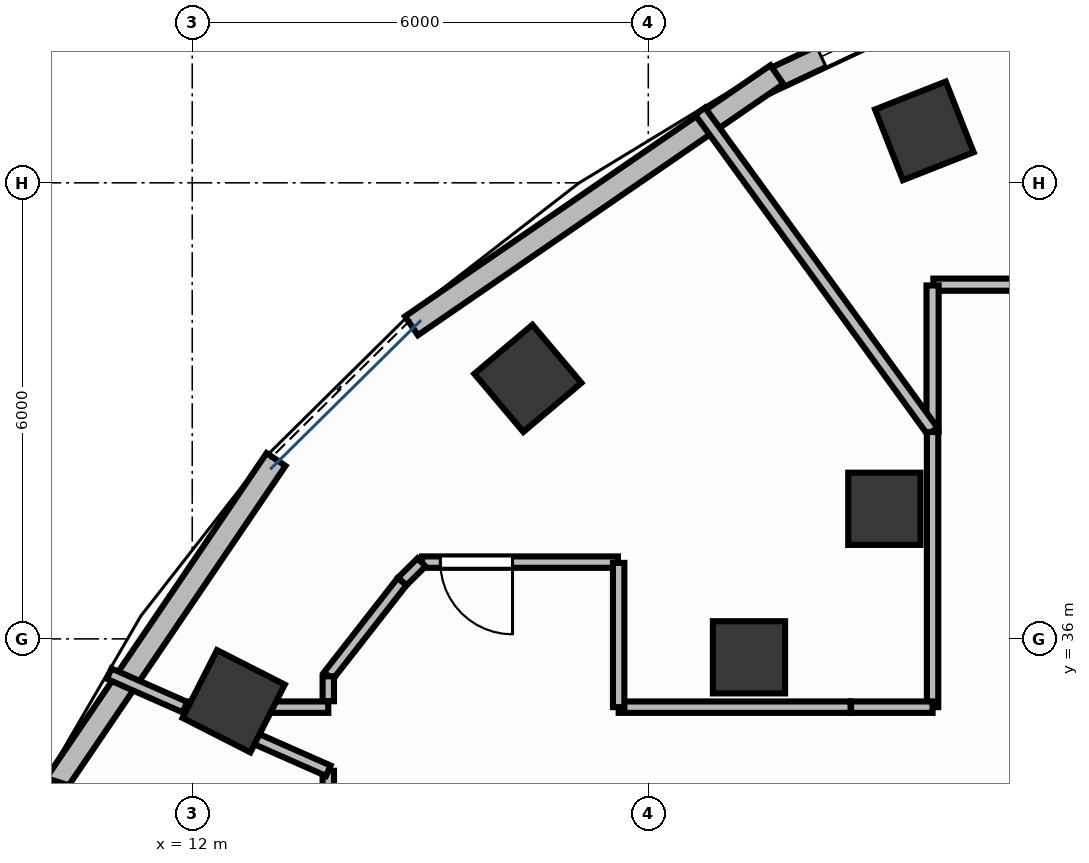
"""IFC4 building model, lengths in metres.
Left out: names, types, materials, properties, quantities, classifications, styles, units other than length and angle.
Written with IfcOpenShell. Run it as: python <this file> out.ifc"""

import sys

from ifc_helpers import new_model, si_unit, direction, frame, frame_2d, origin, origin_2d, place, context, subcontext, project, spatial, rectangle, extrude, element, fill, save


model = new_model("IFC4")
c1 = context("Model", 3, precision=1e-05, world=origin(), true_north=direction((0.0, 1.0)))
c2 = subcontext(c1, "Body", "Model", "MODEL_VIEW")
j1 = project(units=[si_unit("LENGTHUNIT", "METRE"), si_unit("PLANEANGLEUNIT", "RADIAN")], contexts=[c1])
p1 = place(None, origin())
s1 = spatial("IfcSite", under=j1, at=p1, CompositionType="ELEMENT")
p2 = place(p1, origin())
s2 = spatial("IfcBuilding", under=s1, at=p2, CompositionType="ELEMENT")
p3 = place(p2, frame((0.0, 0.0, 200.4)))
s3 = spatial("IfcBuildingStorey", under=s2, at=p3, CompositionType="ELEMENT", Elevation=200.4)
for number, where, z_axis, x_axis in (
    (1, (21.632, 42.684, -0.0), (0.0, 0.0, 1.0), (0.93, 0.367, 0.0)),
    (2, (16.416, 39.427, -0.0), (0.0, 0.0, 1.0), (0.764, 0.645, 0.0)),
):
    element("IfcColumn", number, at=place(p3, frame(where, z_axis=z_axis, x_axis=x_axis)), inside=s3, PredefinedType="COLUMN", context=c2, shape_type="SweptSolid", body=[
        extrude(rectangle(XDim=1.0, YDim=1.0, at=origin_2d()), origin(), (0.0, 0.0, 1.0), 3.901),
    ])
p4 = place(p3, frame((21.105, 37.712, -0.0), z_axis=(0.0, 0.0, 1.0), x_axis=(1.0, 0.0, 0.0)))
e3 = element("IfcColumn", 3, at=p4, inside=s3, PredefinedType="COLUMN", context=c2, shape_type="SweptSolid", body=[
    extrude(rectangle(XDim=0.95, YDim=0.95, at=origin_2d()), origin(), (0.0, 0.0, 1.0), 3.901),
])
p5 = place(p3, frame((12.545, 35.18, -0.0), z_axis=(0.0, 0.0, 1.0), x_axis=(0.453057191132, 0.891481453292, 0.0)))
e4 = element("IfcColumn", 4, at=p5, inside=s3, PredefinedType="COLUMN", context=c2, shape_type="SweptSolid", body=[
    extrude(rectangle(XDim=1.0, YDim=1.0, at=origin_2d()), origin(), (0.0, 0.0, 1.0), 3.901),
])
p6 = place(p3, frame((19.325, 35.758, -0.0), z_axis=(0.0, 0.0, 1.0), x_axis=(1.0, 0.0, 0.0)))
e5 = element("IfcColumn", 5, at=p6, inside=s3, PredefinedType="COLUMN", context=c2, shape_type="SweptSolid", body=[
    extrude(rectangle(XDim=0.95, YDim=0.95, at=origin_2d()), origin(), (0.0, 0.0, 1.0), 3.901),
])
p7 = place(p3, frame((22.349, 44.634, 0.0), z_axis=(0.0, 0.0, 1.0), x_axis=(-0.904928207817, -0.425564259188, 0.0)))
e6 = element("IfcWall", 6, at=p7, inside=s3, PredefinedType="STANDARD", context=c2, shape_type="SweptSolid", body=[
    extrude(rectangle(XDim=3.081, YDim=0.3, at=frame_2d((1.541, 0.0))), origin(), (0.0, 0.0, 1.0), 3.47),
])
p8 = place(p7, frame((0.791, 0.0, 0.95)))
e7 = element("IfcOpeningElement", 7, at=p8, cuts=e6, PredefinedType="OPENING", context=c2, shape_type="SweptSolid", body=[
    extrude(rectangle(XDim=1.5, YDim=1.8, at=frame_2d((0.75, 0.9))), frame((0.0, 0.165, 0.0), z_axis=(0.0, -1.0, 0.0), x_axis=(1.0, 0.0, 0.0)), (0.0, 0.0, 1.0), 0.33),
])
p9 = place(p3, frame((19.692, 43.423, 0.0), z_axis=(0.0, 0.0, 1.0), x_axis=(-0.824151800961, -0.566368968935, 0.0)))
e8 = element("IfcWall", 8, at=p9, inside=s3, PredefinedType="STANDARD", context=c2, shape_type="SweptSolid", body=[
    extrude(rectangle(XDim=5.834, YDim=0.3, at=frame_2d((2.917, 0.0))), origin(), (0.0, 0.0, 1.0), 3.9),
])
p10 = place(p3, frame((13.103, 38.36, 0.0), z_axis=(0.0, 0.0, 1.0), x_axis=(-0.561387104339, -0.827553333074, 0.0)))
e9 = element("IfcWall", 9, at=p10, inside=s3, PredefinedType="STANDARD", context=c2, shape_type="SweptSolid", body=[
    extrude(rectangle(XDim=5.327, YDim=0.3, at=frame_2d((2.664, 0.0))), origin(), (0.0, 0.0, 1.0), 3.47),
])
p11 = place(p3, frame((10.198, 34.13, 0.0), z_axis=(0.0, 0.0, 1.0), x_axis=(-0.30372166002, -0.952760805887, 0.0)))
e10 = element("IfcWall", 10, at=p11, inside=s3, PredefinedType="STANDARD", context=c2, shape_type="SweptSolid", body=[
    extrude(rectangle(XDim=5.077, YDim=0.3, at=frame_2d((2.539, 0.0))), origin(), (0.0, 0.0, 1.0), 3.47),
])
p12 = place(p3, frame((27.015, 40.66, 0.0), z_axis=(0.0, 0.0, 1.0), x_axis=(-1.0, 0.0, 0.0)))
e11 = element("IfcWall", 11, at=p12, inside=s3, PredefinedType="PARTITIONING", context=c2, shape_type="SweptSolid", body=[
    extrude(rectangle(XDim=5.265, YDim=0.16, at=frame_2d((2.632, 0.0))), origin(), (0.0, 0.0, 1.0), 2.91),
])
p13 = place(p12, frame((0.51, 0.0, 0.0)))
e12 = element("IfcOpeningElement", 12, at=p13, cuts=e11, PredefinedType="OPENING", context=c2, shape_type="SweptSolid", body=[
    extrude(rectangle(XDim=0.95, YDim=2.15, at=frame_2d((0.475, 1.075))), frame((0.0, 0.095, 0.0), z_axis=(0.0, -1.0, 0.0), x_axis=(1.0, 0.0, 0.0)), (0.0, 0.0, 1.0), 0.19),
])
p14 = place(p3, frame((17.6, 37.01, 0.0), z_axis=(0.0, 0.0, 1.0), x_axis=(-1.0, 0.0, 0.0)))
e13 = element("IfcWall", 13, at=p14, inside=s3, PredefinedType="PARTITIONING", context=c2, shape_type="SweptSolid", body=[
    extrude(rectangle(XDim=2.576, YDim=0.15, at=frame_2d((1.288, 0.0))), origin(), (0.0, 0.0, 1.0), 2.91),
])
p15 = place(p14, frame((1.386, 0.0, 0.0)))
e14 = element("IfcOpeningElement", 14, at=p15, cuts=e13, PredefinedType="OPENING", context=c2, shape_type="SweptSolid", body=[
    extrude(rectangle(XDim=0.95, YDim=2.15, at=frame_2d((0.475, 1.075))), frame((0.0, 0.09, 0.0), z_axis=(0.0, -1.0, 0.0), x_axis=(1.0, 0.0, 0.0)), (0.0, 0.0, 1.0), 0.18),
])
p16 = place(p3, frame((13.79, 34.266, 0.0), z_axis=(0.0, 0.0, 1.0), x_axis=(0.0, -1.0, 0.0)))
e15 = element("IfcWall", 15, at=p16, inside=s3, PredefinedType="PARTITIONING", context=c2, shape_type="SweptSolid", body=[
    extrude(rectangle(XDim=2.056, YDim=0.15, at=frame_2d((1.028, 0.0))), origin(), (0.0, 0.0, 1.0), 2.91),
])
p17 = place(p16, frame((0.865, 0.0, 0.0)))
e16 = element("IfcOpeningElement", 16, at=p17, cuts=e15, PredefinedType="OPENING", context=c2, shape_type="SweptSolid", body=[
    extrude(rectangle(XDim=0.95, YDim=2.15, at=frame_2d((0.475, 1.075))), frame((0.0, 0.09, 0.0), z_axis=(0.0, -1.0, 0.0), x_axis=(1.0, 0.0, 0.0)), (0.0, 0.0, 1.0), 0.18),
])
p18 = place(p3, frame((21.74, 40.65, 0.0), z_axis=(0.0, 0.0, 1.0), x_axis=(0.0, -1.0, 0.0)))
e17 = element("IfcWall", 17, at=p18, inside=s3, PredefinedType="PARTITIONING", context=c2, shape_type="SweptSolid", body=[
    extrude(rectangle(XDim=1.918, YDim=0.16, at=frame_2d((0.959, 0.0))), origin(), (0.0, 0.0, 1.0), 2.91),
])
p19 = place(p3, frame((21.74, 38.732, 0.0), z_axis=(0.0, 0.0, 1.0), x_axis=(-0.587778316098, 0.80902203377, 0.0)))
e18 = element("IfcWall", 18, at=p19, inside=s3, PredefinedType="PARTITIONING", context=c2, shape_type="SweptSolid", body=[
    extrude(rectangle(XDim=5.204, YDim=0.16, at=frame_2d((2.602, 0.0))), origin(), (0.0, 0.0, 1.0), 2.91),
])
p20 = place(p3, frame((21.74, 38.722, 0.0), z_axis=(0.0, 0.0, 1.0), x_axis=(0.0, -1.0, 0.0)))
e19 = element("IfcWall", 19, at=p20, inside=s3, PredefinedType="PARTITIONING", context=c2, shape_type="SweptSolid", body=[
    extrude(rectangle(XDim=3.62, YDim=0.15, at=frame_2d((1.81, 0.0))), origin(), (0.0, 0.0, 1.0), 2.91),
])
p21 = place(p3, frame((21.74, 35.102, 0.0), z_axis=(0.0, 0.0, 1.0), x_axis=(-1.0, 0.0, 0.0)))
e20 = element("IfcWall", 20, at=p21, inside=s3, PredefinedType="PARTITIONING", context=c2, shape_type="SweptSolid", body=[
    extrude(rectangle(XDim=1.072, YDim=0.15, at=frame_2d((0.536, 0.0))), origin(), (0.0, 0.0, 1.0), 2.91),
])
p22 = place(p3, frame((20.661, 35.102, 0.0), z_axis=(0.0, 0.0, 1.0), x_axis=(-1.0, 0.0, 0.0)))
e21 = element("IfcWall", 21, at=p22, inside=s3, PredefinedType="PARTITIONING", context=c2, shape_type="SweptSolid", body=[
    extrude(rectangle(XDim=3.051, YDim=0.15, at=frame_2d((1.526, 0.0))), origin(), (0.0, 0.0, 1.0), 2.91),
])
p23 = place(p3, frame((17.61, 35.102, 0.0), z_axis=(0.0, 0.0, 1.0), x_axis=(0.0, 1.0, 0.0)))
e22 = element("IfcWall", 22, at=p23, inside=s3, PredefinedType="PARTITIONING", context=c2, shape_type="SweptSolid", body=[
    extrude(rectangle(XDim=1.898, YDim=0.15, at=frame_2d((0.949, 0.0))), origin(), (0.0, 0.0, 1.0), 2.91),
])
p24 = place(p3, frame((15.017, 37.007, 0.0), z_axis=(0.0, 0.0, 1.0), x_axis=(-0.711174408111, -0.70301561949, 0.0)))
e23 = element("IfcWall", 23, at=p24, inside=s3, PredefinedType="PARTITIONING", context=c2, shape_type="SweptSolid", body=[
    extrude(rectangle(XDim=0.359, YDim=0.15, at=frame_2d((0.18, 0.0))), origin(), (0.0, 0.0, 1.0), 2.91),
])
p25 = place(p3, frame((14.76, 36.754, 0.0), z_axis=(0.0, 0.0, 1.0), x_axis=(-0.615625972761, -0.788038489962, 0.0)))
e24 = element("IfcWall", 24, at=p25, inside=s3, PredefinedType="PARTITIONING", context=c2, shape_type="SweptSolid", body=[
    extrude(rectangle(XDim=1.573, YDim=0.15, at=frame_2d((0.787, 0.0))), origin(), (0.0, 0.0, 1.0), 2.91),
])
p26 = place(p3, frame((13.79, 35.508, 0.0), z_axis=(0.0, 0.0, 1.0), x_axis=(0.0, -1.0, 0.0)))
e25 = element("IfcWall", 25, at=p26, inside=s3, PredefinedType="PARTITIONING", context=c2, shape_type="SweptSolid", body=[
    extrude(rectangle(XDim=0.328, YDim=0.15, at=frame_2d((0.164, 0.0))), origin(), (0.0, 0.0, 1.0), 2.91),
])
p27 = place(p3, frame((13.79, 35.102, 0.0), z_axis=(0.0, 0.0, 1.0), x_axis=(-1.0, 0.0, 0.0)))
e26 = element("IfcWall", 26, at=p27, inside=s3, PredefinedType="PARTITIONING", context=c2, shape_type="SweptSolid", body=[
    extrude(rectangle(XDim=1.885, YDim=0.15, at=frame_2d((0.943, 0.0))), origin(), (0.0, 0.0, 1.0), 2.91),
])
p28 = place(p3, frame((11.904, 35.102, 0.0), z_axis=(0.0, 0.0, 1.0), x_axis=(-0.914934829938, 0.403601606744, 0.0)))
e27 = element("IfcWall", 27, at=p28, inside=s3, PredefinedType="PARTITIONING", context=c2, shape_type="SweptSolid", body=[
    extrude(rectangle(XDim=1.09, YDim=0.15, at=frame_2d((0.545, 0.0))), origin(), (0.0, 0.0, 1.0), 2.91),
])
p29 = place(p3, frame((12.438, 34.862, 0.0), z_axis=(0.0, 0.0, 1.0), x_axis=(0.91487830716, -0.403729715389, 0.0)))
e28 = element("IfcWall", 28, at=p29, inside=s3, PredefinedType="PARTITIONING", context=c2, shape_type="SweptSolid", body=[
    extrude(rectangle(XDim=1.477, YDim=0.15, at=frame_2d((0.739, 0.0))), origin(), (0.0, 0.0, 1.0), 2.91),
])
p30 = place(p8, origin())
e29 = element("IfcWindow", 29, at=p30, inside=s3, PartitioningType="DOUBLE_PANEL_VERTICAL", PredefinedType="WINDOW", context=c2, shape_type="SweptSolid", body=[
    extrude(rectangle(XDim=1.5, YDim=1.8, at=frame_2d((0.75, 0.9))), frame((0.0, 0.03, 0.0), z_axis=(0.0, -1.0, 0.0), x_axis=(1.0, 0.0, 0.0)), (0.0, 0.0, 1.0), 0.06),
])
fill(e7, e29)
p31 = place(p15, origin())
e30 = element("IfcDoor", 30, at=p31, inside=s3, OperationType="SINGLE_SWING_LEFT", PredefinedType="DOOR", context=c2, shape_type="SweptSolid", body=[
    extrude(rectangle(XDim=0.95, YDim=2.15, at=frame_2d((0.475, 1.075))), frame((0.0, 0.025, 0.0), z_axis=(0.0, -1.0, 0.0), x_axis=(1.0, 0.0, 0.0)), (0.0, 0.0, 1.0), 0.05),
])
fill(e14, e30)
save(model, sys.argv[1])
